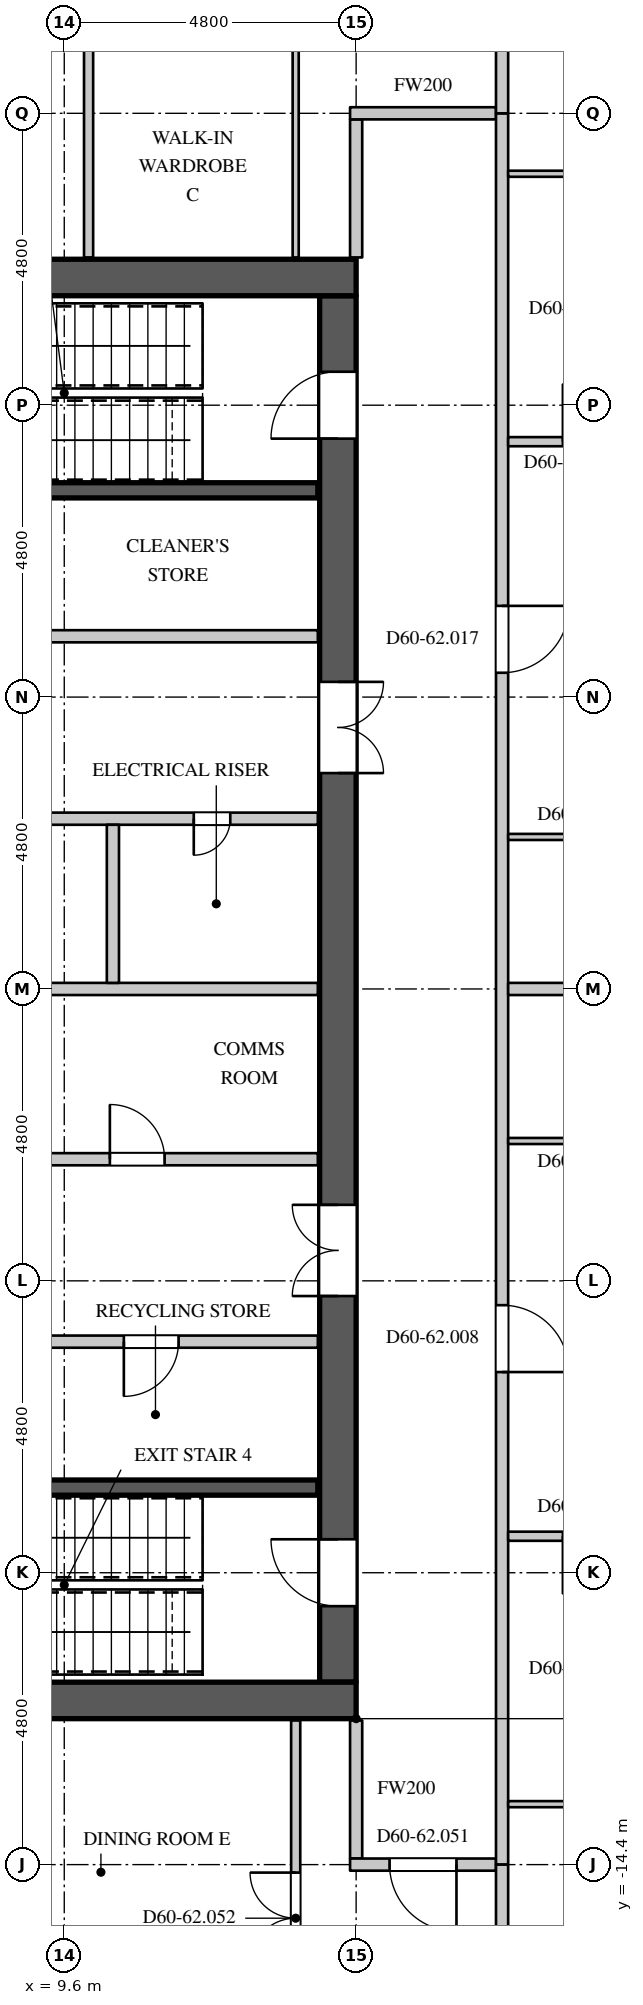
"""IFC4 building model, lengths in metres.
Left out: names, types, materials, properties, quantities, classifications, styles, units other than length and angle.
Written with IfcOpenShell. Run it as: python <this file> out.ifc"""

import sys

from ifc_helpers import new_model, si_unit, direction, frame, frame_2d, origin, place, context, subcontext, project, spatial, rectangle, extrude, element, fill, save


model = new_model("IFC4")
c1 = context("Model", 3, precision=1e-05, world=origin(), true_north=direction((0.0, 1.0)))
c2 = subcontext(c1, "Body", "Model", "MODEL_VIEW")
j1 = project(units=[si_unit("LENGTHUNIT", "METRE"), si_unit("PLANEANGLEUNIT", "RADIAN")], contexts=[c1])
p1 = place(None, origin())
s1 = spatial("IfcSite", under=j1, at=p1, CompositionType="ELEMENT")
p2 = place(p1, origin())
s2 = spatial("IfcBuilding", under=s1, at=p2, CompositionType="ELEMENT")
p3 = place(p2, frame((0.0, 0.0, 260.1)))
s3 = spatial("IfcBuildingStorey", under=s2, at=p3, CompositionType="ELEMENT", Elevation=260.1)
for number, where, z_axis, x_axis in (
    (1, (-14.4, 11.7, 0.0), (0.0, 0.0, 1.0), (1.0, 0.0, 0.0)),
    (2, (-14.4, -11.7, 0.0), (0.0, 0.0, 1.0), (1.0, 0.0, 0.0)),
):
    element("IfcWall", number, at=place(p3, frame(where, z_axis=z_axis, x_axis=x_axis)), inside=s3, PredefinedType="SHEAR", context=c2, shape_type="SweptSolid", body=[
        extrude(rectangle(XDim=28.8, YDim=0.6, at=frame_2d((14.4, 0.0))), origin(), (0.0, 0.0, 1.0), 4.2),
    ])
p4 = place(p3, frame((14.1, -11.4, 0.0), z_axis=(0.0, 0.0, 1.0), x_axis=(0.0, 1.0, 0.0)))
e3 = element("IfcWall", 3, at=p4, inside=s3, PredefinedType="SHEAR", context=c2, shape_type="SweptSolid", body=[
    extrude(rectangle(XDim=22.8, YDim=0.6, at=frame_2d((11.4, 0.0))), origin(), (0.0, 0.0, 1.0), 4.2),
])
p5 = place(p4, frame((20.45, 0.0, 0.0)))
e4 = element("IfcOpeningElement", 4, at=p5, cuts=e3, PredefinedType="OPENING", context=c2, shape_type="SweptSolid", body=[
    extrude(rectangle(XDim=1.1, YDim=2.2, at=frame_2d((0.55, 1.1))), frame((0.0, 0.31, 0.0), z_axis=(0.0, -1.0, 0.0), x_axis=(1.0, 0.0, 0.0)), (0.0, 0.0, 1.0), 0.62),
])
p6 = place(p4, frame((1.25, 0.0, 0.0)))
e5 = element("IfcOpeningElement", 5, at=p6, cuts=e3, PredefinedType="OPENING", context=c2, shape_type="SweptSolid", body=[
    extrude(rectangle(XDim=1.1, YDim=2.2, at=frame_2d((0.55, 1.1))), frame((0.0, 0.31, 0.0), z_axis=(0.0, -1.0, 0.0), x_axis=(1.0, 0.0, 0.0)), (0.0, 0.0, 1.0), 0.62),
])
p7 = place(p4, frame((14.95, 0.0, 0.0)))
e6 = element("IfcOpeningElement", 6, at=p7, cuts=e3, PredefinedType="OPENING", context=c2, shape_type="SweptSolid", body=[
    extrude(rectangle(XDim=1.5, YDim=2.4, at=frame_2d((0.75, 1.2))), frame((0.0, 0.31, 0.0), z_axis=(0.0, -1.0, 0.0), x_axis=(1.0, 0.0, 0.0)), (0.0, 0.0, 1.0), 0.62),
])
p8 = place(p4, frame((6.35, 0.0, 0.0)))
e7 = element("IfcOpeningElement", 7, at=p8, cuts=e3, PredefinedType="OPENING", context=c2, shape_type="SweptSolid", body=[
    extrude(rectangle(XDim=1.5, YDim=2.4, at=frame_2d((0.75, 1.2))), frame((0.0, 0.31, 0.0), z_axis=(0.0, -1.0, 0.0), x_axis=(1.0, 0.0, 0.0)), (0.0, 0.0, 1.0), 0.62),
])
p9 = place(p3, frame((-7.7, 5.8, 0.0), z_axis=(0.0, 0.0, 1.0), x_axis=(1.0, 0.0, 0.0)))
e8 = element("IfcWall", 8, at=p9, inside=s3, PredefinedType="PARTITIONING", context=c2, shape_type="SweptSolid", body=[
    extrude(rectangle(XDim=21.47, YDim=0.2, at=frame_2d((10.735, 0.0))), origin(), (0.0, 0.0, 1.0), 3.95),
])
p10 = place(p9, frame((4.55, 0.0, 0.0)))
e9 = element("IfcOpeningElement", 9, at=p10, cuts=e8, PredefinedType="OPENING", context=c2, shape_type="SweptSolid", body=[
    extrude(rectangle(XDim=0.9, YDim=2.2, at=frame_2d((0.45, 1.1))), frame((0.0, 0.11, 0.0), z_axis=(0.0, -1.0, 0.0), x_axis=(1.0, 0.0, 0.0)), (0.0, 0.0, 1.0), 0.22),
])
p11 = place(p9, frame((15.15, 0.0, 0.0)))
e10 = element("IfcOpeningElement", 10, at=p11, cuts=e8, PredefinedType="OPENING", context=c2, shape_type="SweptSolid", body=[
    extrude(rectangle(XDim=0.9, YDim=2.2, at=frame_2d((0.45, 1.1))), frame((0.0, 0.11, 0.0), z_axis=(0.0, -1.0, 0.0), x_axis=(1.0, 0.0, 0.0)), (0.0, 0.0, 1.0), 0.22),
])
p12 = place(p3, frame((3.58, -5.8, 0.0), z_axis=(0.0, 0.0, 1.0), x_axis=(1.0, 0.0, 0.0)))
e11 = element("IfcWall", 11, at=p12, inside=s3, PredefinedType="PARTITIONING", context=c2, shape_type="SweptSolid", body=[
    extrude(rectangle(XDim=10.19, YDim=0.2, at=frame_2d((5.095, 0.0))), origin(), (0.0, 0.0, 1.0), 3.95),
])
p13 = place(p12, frame((2.0, 0.0, 0.0)))
e12 = element("IfcOpeningElement", 12, at=p13, cuts=e11, PredefinedType="OPENING", context=c2, shape_type="SweptSolid", body=[
    extrude(rectangle(XDim=0.9, YDim=2.2, at=frame_2d((0.45, 1.1))), frame((0.0, 0.11, 0.0), z_axis=(0.0, -1.0, 0.0), x_axis=(1.0, 0.0, 0.0)), (0.0, 0.0, 1.0), 0.22),
])
p14 = place(p12, frame((7.0, 0.0, 0.0)))
e13 = element("IfcOpeningElement", 13, at=p14, cuts=e11, PredefinedType="OPENING", context=c2, shape_type="SweptSolid", body=[
    extrude(rectangle(XDim=0.9, YDim=2.2, at=frame_2d((0.45, 1.1))), frame((0.0, 0.11, 0.0), z_axis=(0.0, -1.0, 0.0), x_axis=(1.0, 0.0, 0.0)), (0.0, 0.0, 1.0), 0.22),
])
p15 = place(p3, frame((14.4, -14.3, 0.0), z_axis=(0.0, 0.0, 1.0), x_axis=(0.0, 1.0, 0.0)))
e14 = element("IfcWall", 14, at=p15, inside=s3, PredefinedType="PARTITIONING", context=c2, shape_type="SweptSolid", body=[
    extrude(rectangle(XDim=2.27, YDim=0.2, at=frame_2d((1.135, 0.0))), origin(), (0.0, 0.0, 1.0), 3.95),
])
p16 = place(p3, frame((14.3, -14.4, 0.0), z_axis=(0.0, 0.0, 1.0), x_axis=(1.0, 0.0, 0.0)))
e15 = element("IfcWall", 15, at=p16, inside=s3, PredefinedType="PARTITIONING", context=c2, shape_type="SweptSolid", body=[
    extrude(rectangle(XDim=2.4, YDim=0.2, at=frame_2d((1.2, 0.0))), origin(), (0.0, 0.0, 1.0), 3.95),
])
p17 = place(p16, frame((0.65, 0.0, 0.0)))
e16 = element("IfcOpeningElement", 16, at=p17, cuts=e15, PredefinedType="OPENING", context=c2, shape_type="SweptSolid", body=[
    extrude(rectangle(XDim=1.1, YDim=2.4, at=frame_2d((0.55, 1.2))), frame((0.0, 0.11, 0.0), z_axis=(0.0, -1.0, 0.0), x_axis=(1.0, 0.0, 0.0)), (0.0, 0.0, 1.0), 0.22),
])
p18 = place(p3, frame((14.4, 12.03, 0.0), z_axis=(0.0, 0.0, 1.0), x_axis=(0.0, 1.0, 0.0)))
e17 = element("IfcWall", 17, at=p18, inside=s3, PredefinedType="PARTITIONING", context=c2, shape_type="SweptSolid", body=[
    extrude(rectangle(XDim=2.27, YDim=0.2, at=frame_2d((1.135, 0.0))), origin(), (0.0, 0.0, 1.0), 3.95),
])
p19 = place(p3, frame((14.3, 14.4, 0.0), z_axis=(0.0, 0.0, 1.0), x_axis=(1.0, 0.0, 0.0)))
e18 = element("IfcWall", 18, at=p19, inside=s3, PredefinedType="PARTITIONING", context=c2, shape_type="SweptSolid", body=[
    extrude(rectangle(XDim=2.4, YDim=0.2, at=frame_2d((1.2, 0.0))), origin(), (0.0, 0.0, 1.0), 3.95),
])
p20 = place(p3, frame((16.8, -14.4, 0.0), z_axis=(0.0, 0.0, 1.0), x_axis=(0.0, 1.0, 0.0)))
e19 = element("IfcWall", 19, at=p20, inside=s3, PredefinedType="PARTITIONING", context=c2, shape_type="SweptSolid", body=[
    extrude(rectangle(XDim=28.8, YDim=0.2, at=frame_2d((14.4, 0.0))), origin(), (0.0, 0.0, 1.0), 3.95),
])
p21 = place(p20, frame((8.1, 0.0, 0.0)))
e20 = element("IfcOpeningElement", 20, at=p21, cuts=e19, PredefinedType="OPENING", context=c2, shape_type="SweptSolid", body=[
    extrude(rectangle(XDim=1.1, YDim=2.4, at=frame_2d((0.55, 1.2))), frame((0.0, 0.11, 0.0), z_axis=(0.0, -1.0, 0.0), x_axis=(1.0, 0.0, 0.0)), (0.0, 0.0, 1.0), 0.22),
])
p22 = place(p20, frame((19.6, 0.0, 0.0)))
e21 = element("IfcOpeningElement", 21, at=p22, cuts=e19, PredefinedType="OPENING", context=c2, shape_type="SweptSolid", body=[
    extrude(rectangle(XDim=1.1, YDim=2.4, at=frame_2d((0.55, 1.2))), frame((0.0, 0.11, 0.0), z_axis=(0.0, -1.0, 0.0), x_axis=(1.0, 0.0, 0.0)), (0.0, 0.0, 1.0), 0.22),
])
p23 = place(p3, frame((10.0, 12.03, 0.0), z_axis=(0.0, 0.0, 1.0), x_axis=(0.0, 1.0, 0.0)))
e22 = element("IfcWall", 22, at=p23, inside=s3, PredefinedType="PARTITIONING", context=c2, shape_type="SweptSolid", body=[
    extrude(rectangle(XDim=7.395, YDim=0.15, at=frame_2d((3.698, 0.0))), origin(), (0.0, 0.0, 1.0), 3.95),
])
p24 = place(p3, frame((13.406, -25.731, 0.0), z_axis=(0.0, 0.0, 1.0), x_axis=(0.0, 1.0, 0.0)))
e23 = element("IfcWall", 23, at=p24, inside=s3, PredefinedType="PARTITIONING", context=c2, shape_type="SweptSolid", body=[
    extrude(rectangle(XDim=13.701, YDim=0.15, at=frame_2d((6.851, 0.0))), origin(), (0.0, 0.0, 1.0), 3.3),
])
p25 = place(p24, frame((9.7, 0.0, 0.0)))
e24 = element("IfcOpeningElement", 24, at=p25, cuts=e23, PredefinedType="OPENING", context=c2, shape_type="SweptSolid", body=[
    extrude(rectangle(XDim=1.5, YDim=2.2, at=frame_2d((0.75, 1.1))), frame((0.0, 0.085, 0.0), z_axis=(0.0, -1.0, 0.0), x_axis=(1.0, 0.0, 0.0)), (0.0, 0.0, 1.0), 0.17),
])
p26 = place(p3, frame((16.9, -9.0, 0.0), z_axis=(0.0, 0.0, 1.0), x_axis=(1.0, 0.0, 0.0)))
e25 = element("IfcWall", 25, at=p26, inside=s3, PredefinedType="PARTITIONING", context=c2, shape_type="SweptSolid", body=[
    extrude(rectangle(XDim=2.775, YDim=0.15, at=frame_2d((1.388, 0.0))), origin(), (0.0, 0.0, 1.0), 3.95),
])
p27 = place(p26, frame((0.9, 0.0, 0.0)))
e26 = element("IfcOpeningElement", 26, at=p27, cuts=e25, PredefinedType="OPENING", context=c2, shape_type="SweptSolid", body=[
    extrude(rectangle(XDim=0.95, YDim=2.2, at=frame_2d((0.475, 1.1))), frame((0.0, 0.085, 0.0), z_axis=(0.0, -1.0, 0.0), x_axis=(1.0, 0.0, 0.0)), (0.0, 0.0, 1.0), 0.17),
])
p28 = place(p3, frame((16.9, 9.0, 0.0), z_axis=(0.0, 0.0, 1.0), x_axis=(1.0, 0.0, 0.0)))
e27 = element("IfcWall", 27, at=p28, inside=s3, PredefinedType="PARTITIONING", context=c2, shape_type="SweptSolid", body=[
    extrude(rectangle(XDim=2.775, YDim=0.15, at=frame_2d((1.388, 0.0))), origin(), (0.0, 0.0, 1.0), 3.95),
])
p29 = place(p28, frame((0.9, 0.0, 0.0)))
e28 = element("IfcOpeningElement", 28, at=p29, cuts=e27, PredefinedType="OPENING", context=c2, shape_type="SweptSolid", body=[
    extrude(rectangle(XDim=0.95, YDim=2.2, at=frame_2d((0.475, 1.1))), frame((0.0, 0.085, 0.0), z_axis=(0.0, -1.0, 0.0), x_axis=(1.0, 0.0, 0.0)), (0.0, 0.0, 1.0), 0.17),
])
p30 = place(p3, frame((16.8, -19.803, 0.0), z_axis=(0.0, 0.0, 1.0), x_axis=(0.0, 1.0, 0.0)))
e29 = element("IfcWall", 29, at=p30, inside=s3, PredefinedType="PARTITIONING", context=c2, shape_type="SweptSolid", body=[
    extrude(rectangle(XDim=5.403, YDim=0.2, at=frame_2d((2.702, 0.0))), origin(), (0.0, 0.0, 1.0), 3.95),
])
p31 = place(p3, frame((16.9, 0.0, 0.0), z_axis=(0.0, 0.0, 1.0), x_axis=(1.0, 0.0, 0.0)))
e30 = element("IfcWall", 30, at=p31, inside=s3, PredefinedType="PARTITIONING", context=c2, shape_type="SweptSolid", body=[
    extrude(rectangle(XDim=9.555, YDim=0.2, at=frame_2d((4.778, 0.0))), origin(), (0.0, 0.0, 1.0), 3.95),
])
p32 = place(p3, frame((16.8, 14.4, 0.0), z_axis=(0.0, 0.0, 1.0), x_axis=(0.0, 1.0, 0.0)))
e31 = element("IfcWall", 31, at=p32, inside=s3, PredefinedType="PARTITIONING", context=c2, shape_type="SweptSolid", body=[
    extrude(rectangle(XDim=5.403, YDim=0.2, at=frame_2d((2.702, 0.0))), origin(), (0.0, 0.0, 1.0), 3.95),
])
p33 = place(p3, frame((0.18, 2.8, 0.0), z_axis=(0.0, 0.0, 1.0), x_axis=(1.0, 0.0, 0.0)))
e32 = element("IfcWall", 32, at=p33, inside=s3, PredefinedType="PARTITIONING", context=c2, shape_type="SweptSolid", body=[
    extrude(rectangle(XDim=13.59, YDim=0.2, at=frame_2d((6.795, 0.0))), origin(), (0.0, 0.0, 1.0), 3.95),
])
p34 = place(p33, frame((11.55, 0.0, 0.0)))
e33 = element("IfcOpeningElement", 33, at=p34, cuts=e32, PredefinedType="OPENING", context=c2, shape_type="SweptSolid", body=[
    extrude(rectangle(XDim=0.6, YDim=2.0, at=frame_2d((0.3, 1.0))), frame((0.0, 0.11, 0.0), z_axis=(0.0, -1.0, 0.0), x_axis=(1.0, 0.0, 0.0)), (0.0, 0.0, 1.0), 0.22),
])
p35 = place(p33, frame((2.25, 0.0, 0.0)))
e34 = element("IfcOpeningElement", 34, at=p35, cuts=e32, PredefinedType="OPENING", context=c2, shape_type="SweptSolid", body=[
    extrude(rectangle(XDim=0.9, YDim=2.2, at=frame_2d((0.45, 1.1))), frame((0.0, 0.11, 0.0), z_axis=(0.0, -1.0, 0.0), x_axis=(1.0, 0.0, 0.0)), (0.0, 0.0, 1.0), 0.22),
])
p36 = place(p33, frame((7.25, 0.0, 0.0)))
e35 = element("IfcOpeningElement", 35, at=p36, cuts=e32, PredefinedType="OPENING", context=c2, shape_type="SweptSolid", body=[
    extrude(rectangle(XDim=0.9, YDim=2.2, at=frame_2d((0.45, 1.1))), frame((0.0, 0.11, 0.0), z_axis=(0.0, -1.0, 0.0), x_axis=(1.0, 0.0, 0.0)), (0.0, 0.0, 1.0), 0.22),
])
p37 = place(p3, frame((7.8, -2.8, 0.0), z_axis=(0.0, 0.0, 1.0), x_axis=(1.0, 0.0, 0.0)))
e36 = element("IfcWall", 36, at=p37, inside=s3, PredefinedType="PARTITIONING", context=c2, shape_type="SweptSolid", body=[
    extrude(rectangle(XDim=5.97, YDim=0.2, at=frame_2d((2.985, 0.0))), origin(), (0.0, 0.0, 1.0), 3.95),
])
p38 = place(p37, frame((2.55, 0.0, 0.0)))
e37 = element("IfcOpeningElement", 37, at=p38, cuts=e36, PredefinedType="OPENING", context=c2, shape_type="SweptSolid", body=[
    extrude(rectangle(XDim=0.9, YDim=2.2, at=frame_2d((0.45, 1.1))), frame((0.0, 0.11, 0.0), z_axis=(0.0, -1.0, 0.0), x_axis=(1.0, 0.0, 0.0)), (0.0, 0.0, 1.0), 0.22),
])
p39 = place(p3, frame((7.8, 0.0, 0.0), z_axis=(0.0, 0.0, 1.0), x_axis=(1.0, 0.0, 0.0)))
e38 = element("IfcWall", 38, at=p39, inside=s3, PredefinedType="PARTITIONING", context=c2, shape_type="SweptSolid", body=[
    extrude(rectangle(XDim=5.97, YDim=0.2, at=frame_2d((2.985, 0.0))), origin(), (0.0, 0.0, 1.0), 3.95),
])
p40 = place(p3, frame((10.4, 0.1, 0.0), z_axis=(0.0, 0.0, 1.0), x_axis=(0.0, 1.0, 0.0)))
e39 = element("IfcWall", 39, at=p40, inside=s3, PredefinedType="PARTITIONING", context=c2, shape_type="SweptSolid", body=[
    extrude(rectangle(XDim=2.6, YDim=0.2, at=frame_2d((1.3, 0.0))), origin(), (0.0, 0.0, 1.0), 3.95),
])
for number, where, z_axis, x_axis in (
    (40, (5.275, -8.2, 0.0), (0.0, 0.0, 1.0), (1.0, 0.0, 0.0)),
    (41, (5.275, 8.2, 0.0), (0.0, 0.0, 1.0), (1.0, 0.0, 0.0)),
):
    element("IfcWall", number, at=place(p3, frame(where, z_axis=z_axis, x_axis=x_axis)), inside=s3, PredefinedType="SHEAR", context=c2, shape_type="SweptSolid", body=[
        extrude(rectangle(XDim=8.495, YDim=0.25, at=frame_2d((4.248, 0.0))), origin(), (0.0, 0.0, 1.0), 3.95),
    ])
p41 = place(p3, frame((13.406, 12.03, 0.0), z_axis=(0.0, 0.0, 1.0), x_axis=(0.0, 1.0, 0.0)))
e42 = element("IfcWall", 42, at=p41, inside=s3, PredefinedType="PARTITIONING", context=c2, shape_type="SweptSolid", body=[
    extrude(rectangle(XDim=4.57, YDim=0.1, at=frame_2d((2.285, 0.0))), origin(), (0.0, 0.0, 1.0), 3.3),
])
p42 = place(p3, frame((16.9, -13.406, 0.0), z_axis=(0.0, 0.0, 1.0), x_axis=(1.0, 0.0, 0.0)))
e43 = element("IfcWall", 43, at=p42, inside=s3, PredefinedType="PARTITIONING", context=c2, shape_type="SweptSolid", body=[
    extrude(rectangle(XDim=2.983, YDim=0.1, at=frame_2d((1.492, 0.0))), origin(), (0.0, 0.0, 1.0), 3.95),
])
p43 = place(p3, frame((16.9, -2.5, 0.0), z_axis=(0.0, 0.0, 1.0), x_axis=(1.0, 0.0, 0.0)))
e44 = element("IfcWall", 44, at=p43, inside=s3, PredefinedType="PARTITIONING", context=c2, shape_type="SweptSolid", body=[
    extrude(rectangle(XDim=3.225, YDim=0.1, at=frame_2d((1.613, 0.0))), origin(), (0.0, 0.0, 1.0), 3.95),
])
p44 = place(p43, frame((1.15, 0.0, 0.0)))
e45 = element("IfcOpeningElement", 45, at=p44, cuts=e44, PredefinedType="OPENING", context=c2, shape_type="SweptSolid", body=[
    extrude(rectangle(XDim=0.9, YDim=2.2, at=frame_2d((0.45, 1.1))), frame((0.0, 0.06, 0.0), z_axis=(0.0, -1.0, 0.0), x_axis=(1.0, 0.0, 0.0)), (0.0, 0.0, 1.0), 0.12),
])
p45 = place(p3, frame((16.9, 2.5, 0.0), z_axis=(0.0, 0.0, 1.0), x_axis=(1.0, 0.0, 0.0)))
e46 = element("IfcWall", 46, at=p45, inside=s3, PredefinedType="PARTITIONING", context=c2, shape_type="SweptSolid", body=[
    extrude(rectangle(XDim=3.225, YDim=0.1, at=frame_2d((1.613, 0.0))), origin(), (0.0, 0.0, 1.0), 3.95),
])
p46 = place(p45, frame((1.15, 0.0, 0.0)))
e47 = element("IfcOpeningElement", 47, at=p46, cuts=e46, PredefinedType="OPENING", context=c2, shape_type="SweptSolid", body=[
    extrude(rectangle(XDim=0.9, YDim=2.2, at=frame_2d((0.45, 1.1))), frame((0.0, 0.06, 0.0), z_axis=(0.0, -1.0, 0.0), x_axis=(1.0, 0.0, 0.0)), (0.0, 0.0, 1.0), 0.12),
])
p47 = place(p3, frame((16.9, 13.406, 0.0), z_axis=(0.0, 0.0, 1.0), x_axis=(1.0, 0.0, 0.0)))
e48 = element("IfcWall", 48, at=p47, inside=s3, PredefinedType="PARTITIONING", context=c2, shape_type="SweptSolid", body=[
    extrude(rectangle(XDim=2.983, YDim=0.1, at=frame_2d((1.492, 0.0))), origin(), (0.0, 0.0, 1.0), 3.95),
])
p48 = place(p34, origin())
e49 = element("IfcDoor", 49, at=p48, inside=s3, OperationType="SINGLE_SWING_RIGHT", PredefinedType="DOOR", context=c2, shape_type="SweptSolid", body=[
    extrude(rectangle(XDim=0.6, YDim=2.0, at=frame_2d((0.3, 1.0))), frame((0.0, 0.025, 0.0), z_axis=(0.0, -1.0, 0.0), x_axis=(1.0, 0.0, 0.0)), (0.0, 0.0, 1.0), 0.05),
])
fill(e33, e49)
p49 = place(p38, origin())
e50 = element("IfcDoor", 50, at=p49, inside=s3, OperationType="SINGLE_SWING_LEFT", PredefinedType="DOOR", context=c2, shape_type="SweptSolid", body=[
    extrude(rectangle(XDim=0.9, YDim=2.2, at=frame_2d((0.45, 1.1))), frame((0.0, 0.025, 0.0), z_axis=(0.0, -1.0, 0.0), x_axis=(1.0, 0.0, 0.0)), (0.0, 0.0, 1.0), 0.05),
])
fill(e37, e50)
p50 = place(p14, origin())
e51 = element("IfcDoor", 51, at=p50, inside=s3, OperationType="SINGLE_SWING_RIGHT", PredefinedType="DOOR", context=c2, shape_type="SweptSolid", body=[
    extrude(rectangle(XDim=0.9, YDim=2.2, at=frame_2d((0.45, 1.1))), frame((0.0, 0.025, 0.0), z_axis=(0.0, -1.0, 0.0), x_axis=(1.0, 0.0, 0.0)), (0.0, 0.0, 1.0), 0.05),
])
fill(e13, e51)
p51 = place(p5, origin())
e52 = element("IfcDoor", 52, at=p51, inside=s3, OperationType="SINGLE_SWING_LEFT", PredefinedType="DOOR", context=c2, shape_type="SweptSolid", body=[
    extrude(rectangle(XDim=1.1, YDim=2.2, at=frame_2d((0.55, 1.1))), frame((0.0, 0.295, 0.0), z_axis=(0.0, -1.0, 0.0), x_axis=(1.0, 0.0, 0.0)), (0.0, 0.0, 1.0), 0.05),
])
fill(e4, e52)
p52 = place(p6, origin())
e53 = element("IfcDoor", 53, at=p52, inside=s3, OperationType="SINGLE_SWING_RIGHT", PredefinedType="DOOR", context=c2, shape_type="SweptSolid", body=[
    extrude(rectangle(XDim=1.1, YDim=2.2, at=frame_2d((0.55, 1.1))), frame((0.0, 0.295, 0.0), z_axis=(0.0, -1.0, 0.0), x_axis=(1.0, 0.0, 0.0)), (0.0, 0.0, 1.0), 0.05),
])
fill(e5, e53)
p53 = place(p7, origin())
e54 = element("IfcDoor", 54, at=p53, inside=s3, OperationType="DOUBLE_DOOR_SINGLE_SWING", PredefinedType="DOOR", context=c2, shape_type="SweptSolid", body=[
    extrude(rectangle(XDim=1.5, YDim=2.4, at=frame_2d((0.75, 1.2))), frame((0.0, -0.245, 0.0), z_axis=(0.0, -1.0, 0.0), x_axis=(1.0, 0.0, 0.0)), (0.0, 0.0, 1.0), 0.05),
])
fill(e6, e54)
p54 = place(p8, origin())
e55 = element("IfcDoor", 55, at=p54, inside=s3, OperationType="DOUBLE_DOOR_SINGLE_SWING", PredefinedType="DOOR", context=c2, shape_type="SweptSolid", body=[
    extrude(rectangle(XDim=1.5, YDim=2.4, at=frame_2d((0.75, 1.2))), frame((0.0, 0.295, 0.0), z_axis=(0.0, -1.0, 0.0), x_axis=(1.0, 0.0, 0.0)), (0.0, 0.0, 1.0), 0.05),
])
fill(e7, e55)
p55 = place(p21, origin())
e56 = element("IfcDoor", 56, at=p55, inside=s3, OperationType="SINGLE_SWING_RIGHT", PredefinedType="DOOR", context=c2, shape_type="SweptSolid", body=[
    extrude(rectangle(XDim=1.1, YDim=2.4, at=frame_2d((0.55, 1.2))), frame((0.0, 0.025, 0.0), z_axis=(0.0, -1.0, 0.0), x_axis=(1.0, 0.0, 0.0)), (0.0, 0.0, 1.0), 0.05),
])
fill(e20, e56)
p56 = place(p27, origin())
e57 = element("IfcDoor", 57, at=p56, inside=s3, OperationType="SINGLE_SWING_RIGHT", PredefinedType="DOOR", context=c2, shape_type="SweptSolid", body=[
    extrude(rectangle(XDim=0.95, YDim=2.2, at=frame_2d((0.475, 1.1))), frame((0.0, 0.025, 0.0), z_axis=(0.0, -1.0, 0.0), x_axis=(1.0, 0.0, 0.0)), (0.0, 0.0, 1.0), 0.05),
])
fill(e26, e57)
p57 = place(p22, origin())
e58 = element("IfcDoor", 58, at=p57, inside=s3, OperationType="SINGLE_SWING_LEFT", PredefinedType="DOOR", context=c2, shape_type="SweptSolid", body=[
    extrude(rectangle(XDim=1.1, YDim=2.4, at=frame_2d((0.55, 1.2))), frame((0.0, 0.025, 0.0), z_axis=(0.0, -1.0, 0.0), x_axis=(1.0, 0.0, 0.0)), (0.0, 0.0, 1.0), 0.05),
])
fill(e21, e58)
p58 = place(p29, origin())
e59 = element("IfcDoor", 59, at=p58, inside=s3, OperationType="SINGLE_SWING_LEFT", PredefinedType="DOOR", context=c2, shape_type="SweptSolid", body=[
    extrude(rectangle(XDim=0.95, YDim=2.2, at=frame_2d((0.475, 1.1))), frame((0.0, 0.025, 0.0), z_axis=(0.0, -1.0, 0.0), x_axis=(1.0, 0.0, 0.0)), (0.0, 0.0, 1.0), 0.05),
])
fill(e28, e59)
p59 = place(p17, origin())
e60 = element("IfcDoor", 60, at=p59, inside=s3, OperationType="SINGLE_SWING_LEFT", PredefinedType="DOOR", context=c2, shape_type="SweptSolid", body=[
    extrude(rectangle(XDim=1.1, YDim=2.4, at=frame_2d((0.55, 1.2))), frame((0.0, 0.025, 0.0), z_axis=(0.0, -1.0, 0.0), x_axis=(1.0, 0.0, 0.0)), (0.0, 0.0, 1.0), 0.05),
])
fill(e16, e60)
p60 = place(p25, origin())
e61 = element("IfcDoor", 61, at=p60, inside=s3, OperationType="DOUBLE_DOOR_SINGLE_SWING", PredefinedType="DOOR", context=c2, shape_type="SweptSolid", body=[
    extrude(rectangle(XDim=1.5, YDim=2.2, at=frame_2d((0.75, 1.1))), frame((0.0, 0.025, 0.0), z_axis=(0.0, -1.0, 0.0), x_axis=(1.0, 0.0, 0.0)), (0.0, 0.0, 1.0), 0.05),
])
fill(e24, e61)
save(model, sys.argv[1])
